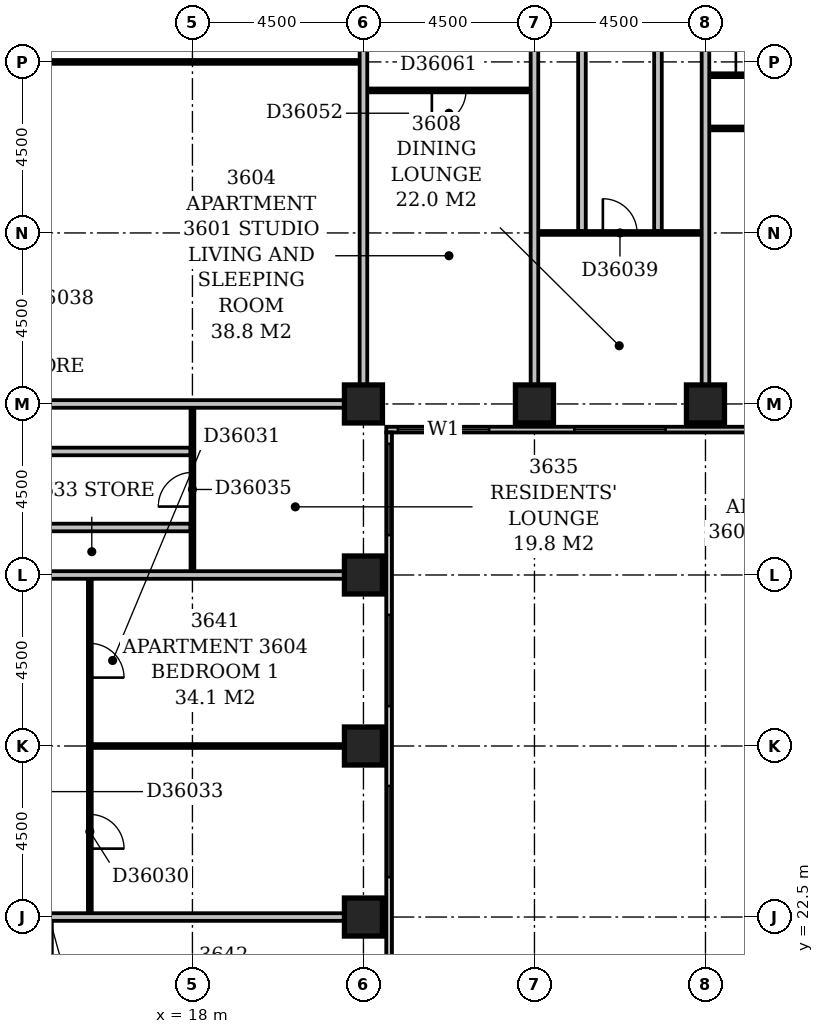
"""IFC4 building model, lengths in metres.
Left out: names, types, materials, properties, quantities, classifications, styles, units other than length and angle.
Written with IfcOpenShell. Run it as: python <this file> out.ifc"""

import sys

from ifc_helpers import new_model, si_unit, direction, frame, frame_2d, origin, origin_2d, place, context, subcontext, project, spatial, rectangle, extrude, element, fill, save


model = new_model("IFC4")
c1 = context("Model", 3, precision=1e-05, world=origin(), true_north=direction((0.0, 1.0)))
c2 = subcontext(c1, "Body", "Model", "MODEL_VIEW")
j1 = project(units=[si_unit("LENGTHUNIT", "METRE"), si_unit("PLANEANGLEUNIT", "RADIAN")], contexts=[c1])
p1 = place(None, origin())
s1 = spatial("IfcSite", under=j1, at=p1, CompositionType="ELEMENT")
p2 = place(p1, origin())
s2 = spatial("IfcBuilding", under=s1, at=p2, CompositionType="ELEMENT")
p3 = place(p2, frame((0.0, 0.0, 144.8)))
s3 = spatial("IfcBuildingStorey", under=s2, at=p3, CompositionType="ELEMENT", Elevation=144.8)
for number, where, z_axis, x_axis in (
    (1, (22.5, 22.5, -0.3), (0.0, 0.0, 1.0), (1.0, 0.0, 0.0)),
    (2, (22.5, 27.0, -0.3), (0.0, 0.0, 1.0), (1.0, 0.0, 0.0)),
    (3, (22.5, 31.5, -0.3), (0.0, 0.0, 1.0), (1.0, 0.0, 0.0)),
    (4, (22.5, 36.0, -0.3), (0.0, 0.0, 1.0), (1.0, 0.0, 0.0)),
    (5, (27.0, 36.0, -0.3), (0.0, 0.0, 1.0), (1.0, 0.0, 0.0)),
    (6, (31.5, 36.0, -0.3), (0.0, 0.0, 1.0), (1.0, 0.0, 0.0)),
):
    element("IfcColumn", number, at=place(p3, frame(where, z_axis=z_axis, x_axis=x_axis)), inside=s3, PredefinedType="COLUMN", context=c2, shape_type="SweptSolid", body=[
        extrude(rectangle(XDim=1.0, YDim=1.0, at=origin_2d()), origin(), (0.0, 0.0, 1.0), 3.6),
    ])
p4 = place(p3, frame((23.175, 17.4, 0.0), z_axis=(0.0, 0.0, 1.0), x_axis=(0.0, 1.0, 0.0)))
e7 = element("IfcWall", 7, at=p4, inside=s3, PredefinedType="STANDARD", context=c2, shape_type="SweptSolid", body=[
    extrude(rectangle(XDim=17.85, YDim=0.15, at=frame_2d((8.925, 0.0))), origin(), (0.0, 0.0, 1.0), 2.7),
])
p5 = place(p4, frame((1.432, 0.0, 0.6)))
e8 = element("IfcOpeningElement", 8, at=p5, cuts=e7, PredefinedType="OPENING", context=c2, shape_type="SweptSolid", body=[
    extrude(rectangle(XDim=2.4, YDim=1.8, at=frame_2d((1.2, 0.9))), frame((0.0, 0.087, 0.0), z_axis=(0.0, -1.0, 0.0), x_axis=(1.0, 0.0, 0.0)), (0.0, 0.0, 1.0), 0.174),
])
p6 = place(p4, frame((6.15, 0.0, 0.6)))
e9 = element("IfcOpeningElement", 9, at=p6, cuts=e7, PredefinedType="OPENING", context=c2, shape_type="SweptSolid", body=[
    extrude(rectangle(XDim=2.4, YDim=1.8, at=frame_2d((1.2, 0.9))), frame((0.0, 0.087, 0.0), z_axis=(0.0, -1.0, 0.0), x_axis=(1.0, 0.0, 0.0)), (0.0, 0.0, 1.0), 0.174),
])
p7 = place(p4, frame((10.65, 0.0, 0.6)))
e10 = element("IfcOpeningElement", 10, at=p7, cuts=e7, PredefinedType="OPENING", context=c2, shape_type="SweptSolid", body=[
    extrude(rectangle(XDim=2.4, YDim=1.8, at=frame_2d((1.2, 0.9))), frame((0.0, 0.087, 0.0), z_axis=(0.0, -1.0, 0.0), x_axis=(1.0, 0.0, 0.0)), (0.0, 0.0, 1.0), 0.174),
])
p8 = place(p4, frame((15.15, 0.0, 0.6)))
e11 = element("IfcOpeningElement", 11, at=p8, cuts=e7, PredefinedType="OPENING", context=c2, shape_type="SweptSolid", body=[
    extrude(rectangle(XDim=2.4, YDim=1.8, at=frame_2d((1.2, 0.9))), frame((0.0, 0.087, 0.0), z_axis=(0.0, -1.0, 0.0), x_axis=(1.0, 0.0, 0.0)), (0.0, 0.0, 1.0), 0.174),
])
p9 = place(p3, frame((23.1, 35.325, 0.0), z_axis=(0.0, 0.0, 1.0), x_axis=(1.0, 0.0, 0.0)))
e12 = element("IfcWall", 12, at=p9, inside=s3, PredefinedType="STANDARD", context=c2, shape_type="SweptSolid", body=[
    extrude(rectangle(XDim=45.15, YDim=0.15, at=frame_2d((22.575, 0.0))), origin(), (0.0, 0.0, 1.0), 2.7),
])
p10 = place(p9, frame((0.306, 0.0, 0.6)))
e13 = element("IfcOpeningElement", 13, at=p10, cuts=e12, PredefinedType="OPENING", context=c2, shape_type="SweptSolid", body=[
    extrude(rectangle(XDim=2.4, YDim=1.8, at=frame_2d((1.2, 0.9))), frame((0.0, 0.087, 0.0), z_axis=(0.0, -1.0, 0.0), x_axis=(1.0, 0.0, 0.0)), (0.0, 0.0, 1.0), 0.174),
])
p11 = place(p9, frame((4.95, 0.0, 0.6)))
e14 = element("IfcOpeningElement", 14, at=p11, cuts=e12, PredefinedType="OPENING", context=c2, shape_type="SweptSolid", body=[
    extrude(rectangle(XDim=2.4, YDim=1.8, at=frame_2d((1.2, 0.9))), frame((0.0, 0.087, 0.0), z_axis=(0.0, -1.0, 0.0), x_axis=(1.0, 0.0, 0.0)), (0.0, 0.0, 1.0), 0.174),
])
p12 = place(p9, frame((9.45, 0.0, 0.6)))
e15 = element("IfcOpeningElement", 15, at=p12, cuts=e12, PredefinedType="OPENING", context=c2, shape_type="SweptSolid", body=[
    extrude(rectangle(XDim=2.4, YDim=1.8, at=frame_2d((1.2, 0.9))), frame((0.0, 0.087, 0.0), z_axis=(0.0, -1.0, 0.0), x_axis=(1.0, 0.0, 0.0)), (0.0, 0.0, 1.0), 0.174),
])
p13 = place(p9, frame((13.95, 0.0, 0.6)))
e16 = element("IfcOpeningElement", 16, at=p13, cuts=e12, PredefinedType="OPENING", context=c2, shape_type="SweptSolid", body=[
    extrude(rectangle(XDim=2.4, YDim=1.8, at=frame_2d((1.2, 0.9))), frame((0.0, 0.087, 0.0), z_axis=(0.0, -1.0, 0.0), x_axis=(1.0, 0.0, 0.0)), (0.0, 0.0, 1.0), 0.174),
])
p14 = place(p9, frame((18.45, 0.0, 0.6)))
e17 = element("IfcOpeningElement", 17, at=p14, cuts=e12, PredefinedType="OPENING", context=c2, shape_type="SweptSolid", body=[
    extrude(rectangle(XDim=2.4, YDim=1.8, at=frame_2d((1.2, 0.9))), frame((0.0, 0.087, 0.0), z_axis=(0.0, -1.0, 0.0), x_axis=(1.0, 0.0, 0.0)), (0.0, 0.0, 1.0), 0.174),
])
p15 = place(p9, frame((23.84, 0.0, 0.6)))
e18 = element("IfcOpeningElement", 18, at=p15, cuts=e12, PredefinedType="OPENING", context=c2, shape_type="SweptSolid", body=[
    extrude(rectangle(XDim=1.8, YDim=1.8, at=frame_2d((0.9, 0.9))), frame((0.0, 0.087, 0.0), z_axis=(0.0, -1.0, 0.0), x_axis=(1.0, 0.0, 0.0)), (0.0, 0.0, 1.0), 0.174),
])
p16 = place(p9, frame((27.45, 0.0, 0.6)))
e19 = element("IfcOpeningElement", 19, at=p16, cuts=e12, PredefinedType="OPENING", context=c2, shape_type="SweptSolid", body=[
    extrude(rectangle(XDim=2.4, YDim=1.8, at=frame_2d((1.2, 0.9))), frame((0.0, 0.087, 0.0), z_axis=(0.0, -1.0, 0.0), x_axis=(1.0, 0.0, 0.0)), (0.0, 0.0, 1.0), 0.174),
])
p17 = place(p9, frame((32.27, 0.0, 0.6)))
e20 = element("IfcOpeningElement", 20, at=p17, cuts=e12, PredefinedType="OPENING", context=c2, shape_type="SweptSolid", body=[
    extrude(rectangle(XDim=2.4, YDim=1.8, at=frame_2d((1.2, 0.9))), frame((0.0, 0.087, 0.0), z_axis=(0.0, -1.0, 0.0), x_axis=(1.0, 0.0, 0.0)), (0.0, 0.0, 1.0), 0.174),
])
p18 = place(p9, frame((36.45, 0.0, 0.6)))
e21 = element("IfcOpeningElement", 21, at=p18, cuts=e12, PredefinedType="OPENING", context=c2, shape_type="SweptSolid", body=[
    extrude(rectangle(XDim=2.4, YDim=1.8, at=frame_2d((1.2, 0.9))), frame((0.0, 0.087, 0.0), z_axis=(0.0, -1.0, 0.0), x_axis=(1.0, 0.0, 0.0)), (0.0, 0.0, 1.0), 0.174),
])
p19 = place(p9, frame((40.95, 0.0, 0.6)))
e22 = element("IfcOpeningElement", 22, at=p19, cuts=e12, PredefinedType="OPENING", context=c2, shape_type="SweptSolid", body=[
    extrude(rectangle(XDim=2.4, YDim=1.8, at=frame_2d((1.2, 0.9))), frame((0.0, 0.087, 0.0), z_axis=(0.0, -1.0, 0.0), x_axis=(1.0, 0.0, 0.0)), (0.0, 0.0, 1.0), 0.174),
])
p20 = place(p3, frame((9.1, 22.5, 0.0), z_axis=(0.0, 0.0, 1.0), x_axis=(1.0, 0.0, 0.0)))
e23 = element("IfcWall", 23, at=p20, inside=s3, PredefinedType="PARTITIONING", context=c2, shape_type="SweptSolid", body=[
    extrude(rectangle(XDim=12.9, YDim=0.2, at=frame_2d((6.45, 0.0))), origin(), (0.0, 0.0, 1.0), 3.3),
])
p21 = place(p3, frame((15.3, 22.6, 0.0), z_axis=(0.0, 0.0, 1.0), x_axis=(0.0, 1.0, 0.0)))
e24 = element("IfcWall", 24, at=p21, inside=s3, PredefinedType="PARTITIONING", context=c2, shape_type="SweptSolid", body=[
    extrude(rectangle(XDim=8.8, YDim=0.1, at=frame_2d((4.4, 0.0))), origin(), (0.0, 0.0, 1.0), 3.3),
])
p22 = place(p21, frame((1.7, 0.0, 0.0)))
e25 = element("IfcOpeningElement", 25, at=p22, cuts=e24, PredefinedType="OPENING", context=c2, shape_type="SweptSolid", body=[
    extrude(rectangle(XDim=0.9, YDim=2.1, at=frame_2d((0.45, 1.05))), frame((0.0, 0.062, 0.0), z_axis=(0.0, -1.0, 0.0), x_axis=(1.0, 0.0, 0.0)), (0.0, 0.0, 1.0), 0.124),
])
p23 = place(p21, frame((6.2, 0.0, 0.0)))
e26 = element("IfcOpeningElement", 26, at=p23, cuts=e24, PredefinedType="OPENING", context=c2, shape_type="SweptSolid", body=[
    extrude(rectangle(XDim=0.9, YDim=2.1, at=frame_2d((0.45, 1.05))), frame((0.0, 0.062, 0.0), z_axis=(0.0, -1.0, 0.0), x_axis=(1.0, 0.0, 0.0)), (0.0, 0.0, 1.0), 0.124),
])
p24 = place(p3, frame((15.35, 27.0, 0.0), z_axis=(0.0, 0.0, 1.0), x_axis=(1.0, 0.0, 0.0)))
e27 = element("IfcWall", 27, at=p24, inside=s3, PredefinedType="PARTITIONING", context=c2, shape_type="SweptSolid", body=[
    extrude(rectangle(XDim=6.65, YDim=0.1, at=frame_2d((3.325, 0.0))), origin(), (0.0, 0.0, 1.0), 2.7),
])
p25 = place(p3, frame((9.1, 31.5, 0.0), z_axis=(0.0, 0.0, 1.0), x_axis=(1.0, 0.0, 0.0)))
e28 = element("IfcWall", 28, at=p25, inside=s3, PredefinedType="PARTITIONING", context=c2, shape_type="SweptSolid", body=[
    extrude(rectangle(XDim=12.9, YDim=0.2, at=frame_2d((6.45, 0.0))), origin(), (0.0, 0.0, 1.0), 3.3),
])
p26 = place(p3, frame((18.0, 31.6, 0.0), z_axis=(0.0, 0.0, 1.0), x_axis=(0.0, 1.0, 0.0)))
e29 = element("IfcWall", 29, at=p26, inside=s3, PredefinedType="PARTITIONING", context=c2, shape_type="SweptSolid", body=[
    extrude(rectangle(XDim=4.3, YDim=0.1, at=frame_2d((2.15, 0.0))), origin(), (0.0, 0.0, 1.0), 3.3),
])
p27 = place(p26, frame((1.7, 0.0, 0.0)))
e30 = element("IfcOpeningElement", 30, at=p27, cuts=e29, PredefinedType="OPENING", context=c2, shape_type="SweptSolid", body=[
    extrude(rectangle(XDim=0.9, YDim=2.1, at=frame_2d((0.45, 1.05))), frame((0.0, 0.062, 0.0), z_axis=(0.0, -1.0, 0.0), x_axis=(1.0, 0.0, 0.0)), (0.0, 0.0, 1.0), 0.124),
])
p28 = place(p3, frame((9.1, 32.75, 0.0), z_axis=(0.0, 0.0, 1.0), x_axis=(1.0, 0.0, 0.0)))
e31 = element("IfcWall", 31, at=p28, inside=s3, PredefinedType="PARTITIONING", context=c2, shape_type="SweptSolid", body=[
    extrude(rectangle(XDim=8.85, YDim=0.2, at=frame_2d((4.425, 0.0))), origin(), (0.0, 0.0, 1.0), 3.3),
])
p29 = place(p28, frame((2.5, 0.0, 0.0)))
e32 = element("IfcOpeningElement", 32, at=p29, cuts=e31, PredefinedType="OPENING", context=c2, shape_type="SweptSolid", body=[
    extrude(rectangle(XDim=0.8, YDim=2.1, at=frame_2d((0.4, 1.05))), frame((0.0, 0.112, 0.0), z_axis=(0.0, -1.0, 0.0), x_axis=(1.0, 0.0, 0.0)), (0.0, 0.0, 1.0), 0.224),
])
p30 = place(p3, frame((9.1, 34.75, 0.0), z_axis=(0.0, 0.0, 1.0), x_axis=(1.0, 0.0, 0.0)))
e33 = element("IfcWall", 33, at=p30, inside=s3, PredefinedType="PARTITIONING", context=c2, shape_type="SweptSolid", body=[
    extrude(rectangle(XDim=8.85, YDim=0.2, at=frame_2d((4.425, 0.0))), origin(), (0.0, 0.0, 1.0), 3.3),
])
p31 = place(p30, frame((2.5, 0.0, 0.0)))
e34 = element("IfcOpeningElement", 34, at=p31, cuts=e33, PredefinedType="OPENING", context=c2, shape_type="SweptSolid", body=[
    extrude(rectangle(XDim=0.8, YDim=2.1, at=frame_2d((0.4, 1.05))), frame((0.0, 0.112, 0.0), z_axis=(0.0, -1.0, 0.0), x_axis=(1.0, 0.0, 0.0)), (0.0, 0.0, 1.0), 0.224),
])
for number, where, z_axis, x_axis in (
    (35, (9.1, 36.0, 0.0), (0.0, 0.0, 1.0), (1.0, 0.0, 0.0)),
    (36, (22.5, 36.5, 0.0), (0.0, 0.0, 1.0), (0.0, 1.0, 0.0)),
):
    element("IfcWall", number, at=place(p3, frame(where, z_axis=z_axis, x_axis=x_axis)), inside=s3, PredefinedType="PARTITIONING", context=c2, shape_type="SweptSolid", body=[
        extrude(rectangle(XDim=12.9, YDim=0.2, at=frame_2d((6.45, 0.0))), origin(), (0.0, 0.0, 1.0), 3.3),
    ])
p32 = place(p3, frame((27.0, 36.5, 0.0), z_axis=(0.0, 0.0, 1.0), x_axis=(0.0, 1.0, 0.0)))
e37 = element("IfcWall", 37, at=p32, inside=s3, PredefinedType="PARTITIONING", context=c2, shape_type="SweptSolid", body=[
    extrude(rectangle(XDim=12.9, YDim=0.2, at=frame_2d((6.45, 0.0))), origin(), (0.0, 0.0, 1.0), 2.6),
])
p33 = place(p3, frame((31.5, 36.5, 0.0), z_axis=(0.0, 0.0, 1.0), x_axis=(0.0, 1.0, 0.0)))
e38 = element("IfcWall", 38, at=p33, inside=s3, PredefinedType="PARTITIONING", context=c2, shape_type="SweptSolid", body=[
    extrude(rectangle(XDim=12.9, YDim=0.2, at=frame_2d((6.45, 0.0))), origin(), (0.0, 0.0, 1.0), 3.3),
])
p34 = place(p3, frame((27.1, 40.5, 0.0), z_axis=(0.0, 0.0, 1.0), x_axis=(1.0, 0.0, 0.0)))
e39 = element("IfcWall", 39, at=p34, inside=s3, PredefinedType="PARTITIONING", context=c2, shape_type="SweptSolid", body=[
    extrude(rectangle(XDim=4.3, YDim=0.1, at=frame_2d((2.15, 0.0))), origin(), (0.0, 0.0, 1.0), 3.3),
])
p35 = place(p34, frame((1.7, 0.0, 0.0)))
e40 = element("IfcOpeningElement", 40, at=p35, cuts=e39, PredefinedType="OPENING", context=c2, shape_type="SweptSolid", body=[
    extrude(rectangle(XDim=0.9, YDim=2.1, at=frame_2d((0.45, 1.05))), frame((0.0, 0.062, 0.0), z_axis=(0.0, -1.0, 0.0), x_axis=(1.0, 0.0, 0.0)), (0.0, 0.0, 1.0), 0.124),
])
p36 = place(p3, frame((28.25, 40.55, 0.0), z_axis=(0.0, 0.0, 1.0), x_axis=(0.0, 1.0, 0.0)))
e41 = element("IfcWall", 41, at=p36, inside=s3, PredefinedType="PARTITIONING", context=c2, shape_type="SweptSolid", body=[
    extrude(rectangle(XDim=8.95, YDim=0.2, at=frame_2d((4.475, 0.0))), origin(), (0.0, 0.0, 1.0), 3.3),
])
p37 = place(p36, frame((5.55, 0.0, 0.0)))
e42 = element("IfcOpeningElement", 42, at=p37, cuts=e41, PredefinedType="OPENING", context=c2, shape_type="SweptSolid", body=[
    extrude(rectangle(XDim=0.8, YDim=2.1, at=frame_2d((0.4, 1.05))), frame((0.0, 0.112, 0.0), z_axis=(0.0, -1.0, 0.0), x_axis=(1.0, 0.0, 0.0)), (0.0, 0.0, 1.0), 0.224),
])
p38 = place(p3, frame((30.25, 40.55, 0.0), z_axis=(0.0, 0.0, 1.0), x_axis=(0.0, 1.0, 0.0)))
e43 = element("IfcWall", 43, at=p38, inside=s3, PredefinedType="PARTITIONING", context=c2, shape_type="SweptSolid", body=[
    extrude(rectangle(XDim=8.95, YDim=0.2, at=frame_2d((4.475, 0.0))), origin(), (0.0, 0.0, 1.0), 3.3),
])
p39 = place(p38, frame((5.55, 0.0, 0.0)))
e44 = element("IfcOpeningElement", 44, at=p39, cuts=e43, PredefinedType="OPENING", context=c2, shape_type="SweptSolid", body=[
    extrude(rectangle(XDim=0.8, YDim=2.1, at=frame_2d((0.4, 1.05))), frame((0.0, 0.112, 0.0), z_axis=(0.0, -1.0, 0.0), x_axis=(1.0, 0.0, 0.0)), (0.0, 0.0, 1.0), 0.224),
])
p40 = place(p3, frame((31.6, 43.25, 0.0), z_axis=(0.0, 0.0, 1.0), x_axis=(1.0, 0.0, 0.0)))
e45 = element("IfcWall", 45, at=p40, inside=s3, PredefinedType="PARTITIONING", context=c2, shape_type="SweptSolid", body=[
    extrude(rectangle(XDim=13.3, YDim=0.1, at=frame_2d((6.65, 0.0))), origin(), (0.0, 0.0, 1.0), 3.3),
])
p41 = place(p40, frame((1.7, 0.0, 0.0)))
e46 = element("IfcOpeningElement", 46, at=p41, cuts=e45, PredefinedType="OPENING", context=c2, shape_type="SweptSolid", body=[
    extrude(rectangle(XDim=0.9, YDim=2.1, at=frame_2d((0.45, 1.05))), frame((0.0, 0.062, 0.0), z_axis=(0.0, -1.0, 0.0), x_axis=(1.0, 0.0, 0.0)), (0.0, 0.0, 1.0), 0.124),
])
p42 = place(p40, frame((6.2, 0.0, 0.0)))
e47 = element("IfcOpeningElement", 47, at=p42, cuts=e45, PredefinedType="OPENING", context=c2, shape_type="SweptSolid", body=[
    extrude(rectangle(XDim=0.9, YDim=2.1, at=frame_2d((0.45, 1.05))), frame((0.0, 0.062, 0.0), z_axis=(0.0, -1.0, 0.0), x_axis=(1.0, 0.0, 0.0)), (0.0, 0.0, 1.0), 0.124),
])
p43 = place(p40, frame((10.7, 0.0, 0.0)))
e48 = element("IfcOpeningElement", 48, at=p43, cuts=e45, PredefinedType="OPENING", context=c2, shape_type="SweptSolid", body=[
    extrude(rectangle(XDim=0.9, YDim=2.1, at=frame_2d((0.45, 1.05))), frame((0.0, 0.062, 0.0), z_axis=(0.0, -1.0, 0.0), x_axis=(1.0, 0.0, 0.0)), (0.0, 0.0, 1.0), 0.124),
])
p44 = place(p3, frame((22.6, 44.25, 0.0), z_axis=(0.0, 0.0, 1.0), x_axis=(1.0, 0.0, 0.0)))
e49 = element("IfcWall", 49, at=p44, inside=s3, PredefinedType="PARTITIONING", context=c2, shape_type="SweptSolid", body=[
    extrude(rectangle(XDim=4.3, YDim=0.1, at=frame_2d((2.15, 0.0))), origin(), (0.0, 0.0, 1.0), 3.3),
])
p45 = place(p44, frame((1.7, 0.0, 0.0)))
e50 = element("IfcOpeningElement", 50, at=p45, cuts=e49, PredefinedType="OPENING", context=c2, shape_type="SweptSolid", body=[
    extrude(rectangle(XDim=0.9, YDim=2.1, at=frame_2d((0.45, 1.05))), frame((0.0, 0.062, 0.0), z_axis=(0.0, -1.0, 0.0), x_axis=(1.0, 0.0, 0.0)), (0.0, 0.0, 1.0), 0.124),
])
p46 = place(p3, frame((31.6, 44.65, 0.0), z_axis=(0.0, 0.0, 1.0), x_axis=(1.0, 0.0, 0.0)))
e51 = element("IfcWall", 51, at=p46, inside=s3, PredefinedType="PARTITIONING", context=c2, shape_type="SweptSolid", body=[
    extrude(rectangle(XDim=10.15, YDim=0.1, at=frame_2d((5.075, 0.0))), origin(), (0.0, 0.0, 1.0), 3.3),
])
p47 = place(p46, frame((0.7, 0.0, 0.0)))
e52 = element("IfcOpeningElement", 52, at=p47, cuts=e51, PredefinedType="OPENING", context=c2, shape_type="SweptSolid", body=[
    extrude(rectangle(XDim=0.8, YDim=2.1, at=frame_2d((0.4, 1.05))), frame((0.0, 0.062, 0.0), z_axis=(0.0, -1.0, 0.0), x_axis=(1.0, 0.0, 0.0)), (0.0, 0.0, 1.0), 0.124),
])
p48 = place(p46, frame((5.8, 0.0, 0.0)))
e53 = element("IfcOpeningElement", 53, at=p48, cuts=e51, PredefinedType="OPENING", context=c2, shape_type="SweptSolid", body=[
    extrude(rectangle(XDim=0.9, YDim=2.1, at=frame_2d((0.45, 1.05))), frame((0.0, 0.062, 0.0), z_axis=(0.0, -1.0, 0.0), x_axis=(1.0, 0.0, 0.0)), (0.0, 0.0, 1.0), 0.124),
])
p49 = place(p3, frame((9.1, 45.0, 0.0), z_axis=(0.0, 0.0, 1.0), x_axis=(1.0, 0.0, 0.0)))
e54 = element("IfcWall", 54, at=p49, inside=s3, PredefinedType="PARTITIONING", context=c2, shape_type="SweptSolid", body=[
    extrude(rectangle(XDim=13.3, YDim=0.1, at=frame_2d((6.65, 0.0))), origin(), (0.0, 0.0, 1.0), 3.3),
])
p50 = place(p6, origin())
e55 = element("IfcWindow", 55, at=p50, inside=s3, PartitioningType="SINGLE_PANEL", PredefinedType="WINDOW", context=c2, shape_type="SweptSolid", body=[
    extrude(rectangle(XDim=2.4, YDim=1.8, at=frame_2d((1.2, 0.9))), frame((0.0, 0.03, 0.0), z_axis=(0.0, -1.0, 0.0), x_axis=(1.0, 0.0, 0.0)), (0.0, 0.0, 1.0), 0.06),
])
fill(e9, e55)
p51 = place(p7, origin())
e56 = element("IfcWindow", 56, at=p51, inside=s3, PartitioningType="SINGLE_PANEL", PredefinedType="WINDOW", context=c2, shape_type="SweptSolid", body=[
    extrude(rectangle(XDim=2.4, YDim=1.8, at=frame_2d((1.2, 0.9))), frame((0.0, 0.03, 0.0), z_axis=(0.0, -1.0, 0.0), x_axis=(1.0, 0.0, 0.0)), (0.0, 0.0, 1.0), 0.06),
])
fill(e10, e56)
p52 = place(p8, origin())
e57 = element("IfcWindow", 57, at=p52, inside=s3, PartitioningType="SINGLE_PANEL", PredefinedType="WINDOW", context=c2, shape_type="SweptSolid", body=[
    extrude(rectangle(XDim=2.4, YDim=1.8, at=frame_2d((1.2, 0.9))), frame((0.0, 0.03, 0.0), z_axis=(0.0, -1.0, 0.0), x_axis=(1.0, 0.0, 0.0)), (0.0, 0.0, 1.0), 0.06),
])
fill(e11, e57)
p53 = place(p10, origin())
e58 = element("IfcWindow", 58, at=p53, inside=s3, PartitioningType="SINGLE_PANEL", PredefinedType="WINDOW", context=c2, shape_type="SweptSolid", body=[
    extrude(rectangle(XDim=2.4, YDim=1.8, at=frame_2d((1.2, 0.9))), frame((0.0, 0.03, 0.0), z_axis=(0.0, -1.0, 0.0), x_axis=(1.0, 0.0, 0.0)), (0.0, 0.0, 1.0), 0.06),
])
fill(e13, e58)
p54 = place(p11, origin())
e59 = element("IfcWindow", 59, at=p54, inside=s3, PartitioningType="SINGLE_PANEL", PredefinedType="WINDOW", context=c2, shape_type="SweptSolid", body=[
    extrude(rectangle(XDim=2.4, YDim=1.8, at=frame_2d((1.2, 0.9))), frame((0.0, 0.03, 0.0), z_axis=(0.0, -1.0, 0.0), x_axis=(1.0, 0.0, 0.0)), (0.0, 0.0, 1.0), 0.06),
])
fill(e14, e59)
p55 = place(p22, frame((0.9, 0.0, 0.0), z_axis=(0.0, 0.0, 1.0), x_axis=(-1.0, 0.0, 0.0)))
e60 = element("IfcDoor", 60, at=p55, inside=s3, OperationType="SINGLE_SWING_RIGHT", PredefinedType="DOOR", context=c2, shape_type="SweptSolid", body=[
    extrude(rectangle(XDim=0.9, YDim=2.1, at=frame_2d((0.45, 1.05))), frame((0.0, 0.025, 0.0), z_axis=(0.0, -1.0, 0.0), x_axis=(1.0, 0.0, 0.0)), (0.0, 0.0, 1.0), 0.05),
])
fill(e25, e60)
p56 = place(p23, frame((0.9, 0.0, 0.0), z_axis=(0.0, 0.0, 1.0), x_axis=(-1.0, 0.0, 0.0)))
e61 = element("IfcDoor", 61, at=p56, inside=s3, OperationType="SINGLE_SWING_RIGHT", PredefinedType="DOOR", context=c2, shape_type="SweptSolid", body=[
    extrude(rectangle(XDim=0.9, YDim=2.1, at=frame_2d((0.45, 1.05))), frame((0.0, 0.025, 0.0), z_axis=(0.0, -1.0, 0.0), x_axis=(1.0, 0.0, 0.0)), (0.0, 0.0, 1.0), 0.05),
])
fill(e26, e61)
p57 = place(p27, origin())
e62 = element("IfcDoor", 62, at=p57, inside=s3, OperationType="SINGLE_SWING_LEFT", PredefinedType="DOOR", context=c2, shape_type="SweptSolid", body=[
    extrude(rectangle(XDim=0.9, YDim=2.1, at=frame_2d((0.45, 1.05))), frame((0.0, 0.025, 0.0), z_axis=(0.0, -1.0, 0.0), x_axis=(1.0, 0.0, 0.0)), (0.0, 0.0, 1.0), 0.05),
])
fill(e30, e62)
p58 = place(p35, origin())
e63 = element("IfcDoor", 63, at=p58, inside=s3, OperationType="SINGLE_SWING_LEFT", PredefinedType="DOOR", context=c2, shape_type="SweptSolid", body=[
    extrude(rectangle(XDim=0.9, YDim=2.1, at=frame_2d((0.45, 1.05))), frame((0.0, 0.025, 0.0), z_axis=(0.0, -1.0, 0.0), x_axis=(1.0, 0.0, 0.0)), (0.0, 0.0, 1.0), 0.05),
])
fill(e40, e63)
p59 = place(p45, frame((0.9, 0.0, 0.0), z_axis=(0.0, 0.0, 1.0), x_axis=(-1.0, 0.0, 0.0)))
e64 = element("IfcDoor", 64, at=p59, inside=s3, OperationType="SINGLE_SWING_RIGHT", PredefinedType="DOOR", context=c2, shape_type="SweptSolid", body=[
    extrude(rectangle(XDim=0.9, YDim=2.1, at=frame_2d((0.45, 1.05))), frame((0.0, 0.025, 0.0), z_axis=(0.0, -1.0, 0.0), x_axis=(1.0, 0.0, 0.0)), (0.0, 0.0, 1.0), 0.05),
])
fill(e50, e64)
p60 = place(p47, origin())
e65 = element("IfcDoor", 65, at=p60, inside=s3, OperationType="SINGLE_SWING_LEFT", PredefinedType="DOOR", context=c2, shape_type="SweptSolid", body=[
    extrude(rectangle(XDim=0.8, YDim=2.1, at=frame_2d((0.4, 1.05))), frame((0.0, 0.025, 0.0), z_axis=(0.0, -1.0, 0.0), x_axis=(1.0, 0.0, 0.0)), (0.0, 0.0, 1.0), 0.05),
])
fill(e52, e65)
save(model, sys.argv[1])
